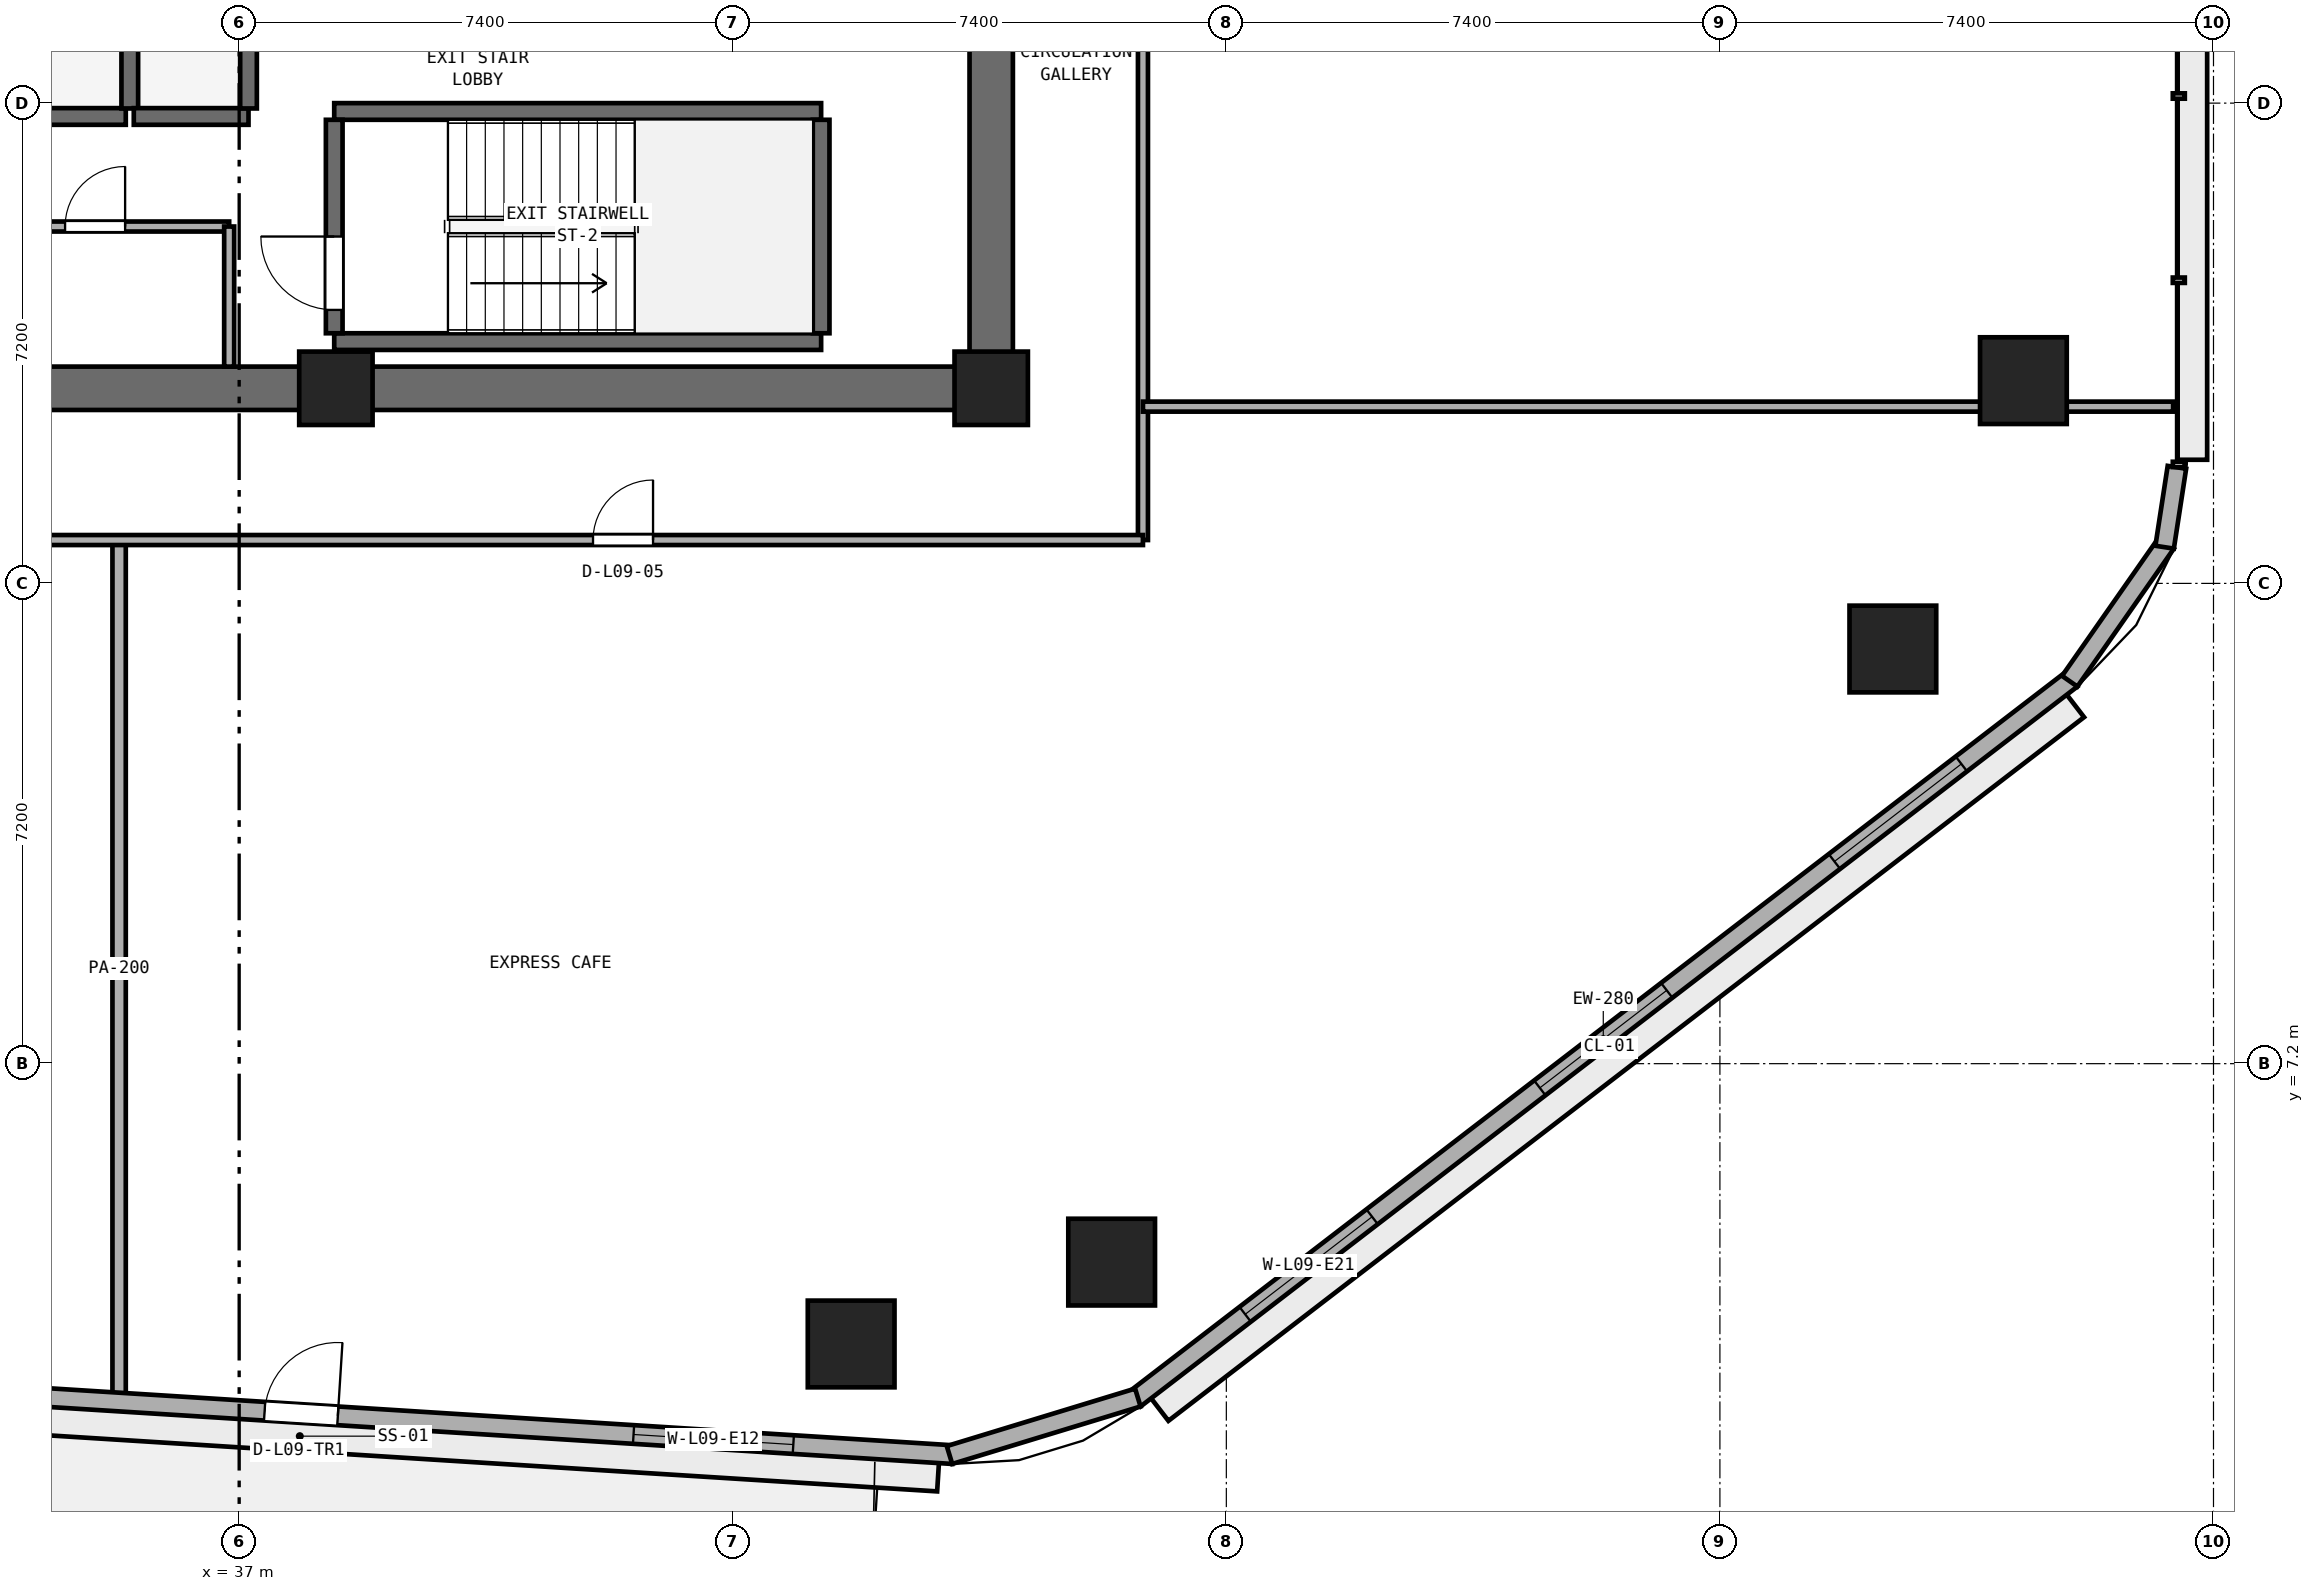
"""IFC4 building model, lengths in metres.
Left out: names, types, materials, properties, quantities, classifications, styles, units other than length and angle.
Written with IfcOpenShell. Run it as: python <this file> out.ifc"""

import sys

from ifc_helpers import new_model, si_unit, direction, frame, frame_2d, origin, origin_2d, place, context, subcontext, project, spatial, rectangle, extrude, element, fill, save


model = new_model("IFC4")
c1 = context("Model", 3, precision=1e-05, world=origin(), true_north=direction((0.0, 1.0)))
c2 = subcontext(c1, "Body", "Model", "MODEL_VIEW")
j1 = project(units=[si_unit("LENGTHUNIT", "METRE"), si_unit("PLANEANGLEUNIT", "RADIAN")], contexts=[c1])
p1 = place(None, origin())
s1 = spatial("IfcSite", under=j1, at=p1, CompositionType="ELEMENT")
p2 = place(p1, origin())
s2 = spatial("IfcBuilding", under=s1, at=p2, CompositionType="ELEMENT")
p3 = place(p2, frame((0.0, 0.0, 40.2)))
s3 = spatial("IfcBuildingStorey", under=s2, at=p3, CompositionType="ELEMENT", Elevation=40.2)
p4 = place(p3, frame((25.4, 17.325, 0.0), z_axis=(0.0, 0.0, 1.0), x_axis=(1.0, 0.0, 0.0)))
e1 = element("IfcWall", 1, at=p4, inside=s3, PredefinedType="SHEAR", context=c2, shape_type="SweptSolid", body=[
    extrude(rectangle(XDim=23.2, YDim=0.65, at=frame_2d((11.6, 0.0))), origin(), (0.0, 0.0, 1.0), 3.525),
])
p5 = place(p3, frame((48.275, 17.65, 0.0), z_axis=(0.0, 0.0, 1.0), x_axis=(0.0, 1.0, 0.0)))
e2 = element("IfcWall", 2, at=p5, inside=s3, PredefinedType="SHEAR", context=c2, shape_type="SweptSolid", body=[
    extrude(rectangle(XDim=15.1, YDim=0.65, at=frame_2d((7.55, 0.0))), origin(), (0.0, 0.0, 1.0), 3.525),
])
p6 = place(p5, frame((5.65, 0.0, 0.0)))
e3 = element("IfcOpeningElement", 3, at=p6, cuts=e2, PredefinedType="OPENING", context=c2, shape_type="SweptSolid", body=[
    extrude(rectangle(XDim=1.5, YDim=2.15, at=frame_2d((0.75, 1.075))), frame((0.0, 0.335, 0.0), z_axis=(0.0, -1.0, 0.0), x_axis=(1.0, 0.0, 0.0)), (0.0, 0.0, 1.0), 0.67),
])
for number, where, z_axis, x_axis in (
    (4, (38.45, 17.325, 0.0), (0.0, 0.0, 1.0), (1.0, 0.0, 0.0)),
    (5, (48.275, 17.325, 0.0), (0.0, 0.0, 1.0), (1.0, 0.0, 0.0)),
):
    element("IfcColumn", number, at=place(p3, frame(where, z_axis=z_axis, x_axis=x_axis)), inside=s3, PredefinedType="PILASTER", context=c2, shape_type="SweptSolid", body=[
        extrude(rectangle(XDim=1.1, YDim=1.1, at=origin_2d()), origin(), (0.0, 0.0, 1.0), 3.8),
    ])
for number, where, z_axis, x_axis in (
    (6, (46.175, 2.998, 0.0), (0.0, 0.0, 1.0), (1.0, 0.0, 0.0)),
    (7, (50.081, 4.225, 0.0), (0.0, 0.0, 1.0), (1.0, 0.0, 0.0)),
    (8, (61.793, 13.416, 0.0), (0.0, 0.0, 1.0), (1.0, 0.0, 0.0)),
    (9, (63.75, 17.44, 0.0), (0.0, 0.0, 1.0), (1.0, 0.0, 0.0)),
):
    element("IfcColumn", number, at=place(p3, frame(where, z_axis=z_axis, x_axis=x_axis)), inside=s3, PredefinedType="COLUMN", context=c2, shape_type="SweptSolid", body=[
        extrude(rectangle(XDim=1.3, YDim=1.3, at=origin_2d()), origin(), (0.0, 0.0, 1.0), 3.8),
    ])
for number, where, z_axis, x_axis in (
    (10, (38.425, 18.025, 0.0), (0.0, 0.0, 1.0), (1.0, 0.0, 0.0)),
    (11, (38.425, 21.475, 0.0), (0.0, 0.0, 1.0), (1.0, 0.0, 0.0)),
):
    element("IfcWall", number, at=place(p3, frame(where, z_axis=z_axis, x_axis=x_axis)), inside=s3, PredefinedType="SHEAR", context=c2, shape_type="SweptSolid", body=[
        extrude(rectangle(XDim=7.3, YDim=0.25, at=frame_2d((3.65, 0.0))), origin(), (0.0, 0.0, 1.0), 3.525),
    ])
p7 = place(p3, frame((38.425, 18.15, 0.0), z_axis=(0.0, 0.0, 1.0), x_axis=(0.0, 1.0, 0.0)))
e12 = element("IfcWall", 12, at=p7, inside=s3, PredefinedType="SHEAR", context=c2, shape_type="SweptSolid", body=[
    extrude(rectangle(XDim=3.2, YDim=0.25, at=frame_2d((1.6, 0.0))), origin(), (0.0, 0.0, 1.0), 3.525),
])
p8 = place(p7, frame((0.35, 0.0, 0.0)))
e13 = element("IfcOpeningElement", 13, at=p8, cuts=e12, PredefinedType="OPENING", context=c2, shape_type="SweptSolid", body=[
    extrude(rectangle(XDim=1.1, YDim=2.15, at=frame_2d((0.55, 1.075))), frame((0.0, 0.135, 0.0), z_axis=(0.0, -1.0, 0.0), x_axis=(1.0, 0.0, 0.0)), (0.0, 0.0, 1.0), 0.27),
])
p9 = place(p3, frame((45.725, 18.15, 0.0), z_axis=(0.0, 0.0, 1.0), x_axis=(0.0, 1.0, 0.0)))
e14 = element("IfcWall", 14, at=p9, inside=s3, PredefinedType="SHEAR", context=c2, shape_type="SweptSolid", body=[
    extrude(rectangle(XDim=3.2, YDim=0.25, at=frame_2d((1.6, 0.0))), origin(), (0.0, 0.0, 1.0), 3.525),
])
p10 = place(p3, frame((33.58, 21.4, 0.0), z_axis=(0.0, 0.0, 1.0), x_axis=(1.0, 0.0, 0.0)))
e15 = element("IfcWall", 15, at=p10, inside=s3, PredefinedType="SHEAR", context=c2, shape_type="SweptSolid", body=[
    extrude(rectangle(XDim=1.72, YDim=0.25, at=frame_2d((0.86, 0.0))), origin(), (0.0, 0.0, 1.0), 3.525),
])
p11 = place(p3, frame((35.36, 21.52, 0.0), z_axis=(0.0, 0.0, 1.0), x_axis=(0.0, 1.0, 0.0)))
e16 = element("IfcWall", 16, at=p11, inside=s3, PredefinedType="SHEAR", context=c2, shape_type="SweptSolid", body=[
    extrude(rectangle(XDim=1.96, YDim=0.25, at=frame_2d((0.98, 0.0))), origin(), (0.0, 0.0, 1.0), 3.525),
])
p12 = place(p3, frame((35.42, 21.4, 0.0), z_axis=(0.0, 0.0, 1.0), x_axis=(1.0, 0.0, 0.0)))
e17 = element("IfcWall", 17, at=p12, inside=s3, PredefinedType="SHEAR", context=c2, shape_type="SweptSolid", body=[
    extrude(rectangle(XDim=1.72, YDim=0.25, at=frame_2d((0.86, 0.0))), origin(), (0.0, 0.0, 1.0), 3.525),
])
p13 = place(p3, frame((37.14, 21.52, 0.0), z_axis=(0.0, 0.0, 1.0), x_axis=(0.0, 1.0, 0.0)))
e18 = element("IfcWall", 18, at=p13, inside=s3, PredefinedType="SHEAR", context=c2, shape_type="SweptSolid", body=[
    extrude(rectangle(XDim=1.96, YDim=0.25, at=frame_2d((0.98, 0.0))), origin(), (0.0, 0.0, 1.0), 3.525),
])
p14 = place(p3, frame((32.83, 19.75, 0.0), z_axis=(0.0, 0.0, 1.0), x_axis=(1.0, 0.0, 0.0)))
e19 = element("IfcWall", 19, at=p14, inside=s3, PredefinedType="PARTITIONING", context=c2, shape_type="SweptSolid", body=[
    extrude(rectangle(XDim=4.02, YDim=0.15, at=frame_2d((2.01, 0.0))), origin(), (0.0, 0.0, 1.0), 3.525),
])
p15 = place(p14, frame((1.56, 0.0, 0.0)))
e20 = element("IfcOpeningElement", 20, at=p15, cuts=e19, PredefinedType="OPENING", context=c2, shape_type="SweptSolid", body=[
    extrude(rectangle(XDim=0.9, YDim=2.1, at=frame_2d((0.45, 1.05))), frame((0.0, 0.085, 0.0), z_axis=(0.0, -1.0, 0.0), x_axis=(1.0, 0.0, 0.0)), (0.0, 0.0, 1.0), 0.17),
])
p16 = place(p3, frame((36.85, 17.65, 0.0), z_axis=(0.0, 0.0, 1.0), x_axis=(0.0, 1.0, 0.0)))
e21 = element("IfcWall", 21, at=p16, inside=s3, PredefinedType="PARTITIONING", context=c2, shape_type="SweptSolid", body=[
    extrude(rectangle(XDim=2.1, YDim=0.15, at=frame_2d((1.05, 0.0))), origin(), (0.0, 0.0, 1.0), 3.525),
])
p17 = place(p3, frame((50.55, 15.05, 0.0), z_axis=(0.0, 0.0, 1.0), x_axis=(0.0, 1.0, 0.0)))
e22 = element("IfcWall", 22, at=p17, inside=s3, PredefinedType="PARTITIONING", context=c2, shape_type="SweptSolid", body=[
    extrude(rectangle(XDim=20.3, YDim=0.15, at=frame_2d((10.15, 0.0))), origin(), (0.0, 0.0, 1.0), 3.525),
])
p18 = place(p17, frame((9.7, 0.0, 0.0)))
e23 = element("IfcOpeningElement", 23, at=p18, cuts=e22, PredefinedType="OPENING", context=c2, shape_type="SweptSolid", body=[
    extrude(rectangle(XDim=0.9, YDim=2.1, at=frame_2d((0.45, 1.05))), frame((0.0, 0.085, 0.0), z_axis=(0.0, -1.0, 0.0), x_axis=(1.0, 0.0, 0.0)), (0.0, 0.0, 1.0), 0.17),
])
p19 = place(p3, frame((35.2, 2.192, 0.0), z_axis=(0.0, 0.0, 1.0), x_axis=(0.0, 1.0, 0.0)))
e24 = element("IfcWall", 24, at=p19, inside=s3, PredefinedType="PARTITIONING", context=c2, shape_type="SweptSolid", body=[
    extrude(rectangle(XDim=12.858, YDim=0.2, at=frame_2d((6.429, 0.0))), origin(), (0.0, 0.0, 1.0), 3.525),
])
p20 = place(p3, frame((23.45, 15.05, 0.0), z_axis=(0.0, 0.0, 1.0), x_axis=(1.0, 0.0, 0.0)))
e25 = element("IfcWall", 25, at=p20, inside=s3, PredefinedType="PARTITIONING", context=c2, shape_type="SweptSolid", body=[
    extrude(rectangle(XDim=27.1, YDim=0.15, at=frame_2d((13.55, 0.0))), origin(), (0.0, 0.0, 1.0), 3.525),
])
p21 = place(p20, frame((5.17, 0.0, 0.0)))
e26 = element("IfcOpeningElement", 26, at=p21, cuts=e25, PredefinedType="OPENING", context=c2, shape_type="SweptSolid", body=[
    extrude(rectangle(XDim=1.65, YDim=2.15, at=frame_2d((0.825, 1.075))), frame((0.0, 0.085, 0.0), z_axis=(0.0, -1.0, 0.0), x_axis=(1.0, 0.0, 0.0)), (0.0, 0.0, 1.0), 0.17),
])
p22 = place(p20, frame((18.855, 0.0, 0.0)))
e27 = element("IfcOpeningElement", 27, at=p22, cuts=e25, PredefinedType="OPENING", context=c2, shape_type="SweptSolid", body=[
    extrude(rectangle(XDim=0.9, YDim=2.1, at=frame_2d((0.45, 1.05))), frame((0.0, 0.085, 0.0), z_axis=(0.0, -1.0, 0.0), x_axis=(1.0, 0.0, 0.0)), (0.0, 0.0, 1.0), 0.17),
])
p23 = place(p3, frame((50.55, 17.05, 0.0), z_axis=(0.0, 0.0, 1.0), x_axis=(1.0, 0.0, 0.0)))
e28 = element("IfcWall", 28, at=p23, inside=s3, PredefinedType="PARTITIONING", context=c2, shape_type="SweptSolid", body=[
    extrude(rectangle(XDim=15.445, YDim=0.15, at=frame_2d((7.723, 0.0))), origin(), (0.0, 0.0, 1.0), 3.525),
])
p24 = place(p3, frame((28.161, 2.571, 0.0), z_axis=(0.0, 0.0, 1.0), x_axis=(0.998017288298, -0.06294038654, 0.0)))
e29 = element("IfcWall", 29, at=p24, inside=s3, PredefinedType="STANDARD", context=c2, shape_type="SweptSolid", body=[
    extrude(rectangle(XDim=19.577, YDim=0.28, at=frame_2d((9.789, 0.0))), origin(), (0.0, 0.0, 1.0), 3.525),
])
p25 = place(p24, frame((9.239, 0.0, 0.0)))
e30 = element("IfcOpeningElement", 30, at=p25, cuts=e29, PredefinedType="OPENING", context=c2, shape_type="SweptSolid", body=[
    extrude(rectangle(XDim=1.1, YDim=2.2, at=frame_2d((0.55, 1.1))), frame((0.0, 0.15, 0.0), z_axis=(0.0, -1.0, 0.0), x_axis=(1.0, 0.0, 0.0)), (0.0, 0.0, 1.0), 0.3),
])
p26 = place(p24, frame((2.396, 0.0, 0.9)))
e31 = element("IfcOpeningElement", 31, at=p26, cuts=e29, PredefinedType="OPENING", context=c2, shape_type="SweptSolid", body=[
    extrude(rectangle(XDim=2.4, YDim=1.75, at=frame_2d((1.2, 0.875))), frame((0.0, 0.15, 0.0), z_axis=(0.0, -1.0, 0.0), x_axis=(1.0, 0.0, 0.0)), (0.0, 0.0, 1.0), 0.3),
])
p27 = place(p24, frame((14.781, 0.0, 0.9)))
e32 = element("IfcOpeningElement", 32, at=p27, cuts=e29, PredefinedType="OPENING", context=c2, shape_type="SweptSolid", body=[
    extrude(rectangle(XDim=2.4, YDim=1.75, at=frame_2d((1.2, 0.875))), frame((0.0, 0.15, 0.0), z_axis=(0.0, -1.0, 0.0), x_axis=(1.0, 0.0, 0.0)), (0.0, 0.0, 1.0), 0.3),
])
p28 = place(p3, frame((50.429, 2.172, 0.0), z_axis=(0.0, 0.0, 1.0), x_axis=(0.792937466367, 0.609303023488, 0.0)))
e33 = element("IfcWall", 33, at=p28, inside=s3, PredefinedType="STANDARD", context=c2, shape_type="SweptSolid", body=[
    extrude(rectangle(XDim=17.713, YDim=0.28, at=frame_2d((8.856, 0.0))), origin(), (0.0, 0.0, 1.0), 3.525),
])
p29 = place(p28, frame((2.085, 0.0, 0.9)))
e34 = element("IfcOpeningElement", 34, at=p29, cuts=e33, PredefinedType="OPENING", context=c2, shape_type="SweptSolid", body=[
    extrude(rectangle(XDim=2.4, YDim=1.75, at=frame_2d((1.2, 0.875))), frame((0.0, 0.15, 0.0), z_axis=(0.0, -1.0, 0.0), x_axis=(1.0, 0.0, 0.0)), (0.0, 0.0, 1.0), 0.3),
])
p30 = place(p28, frame((7.656, 0.0, 0.9)))
e35 = element("IfcOpeningElement", 35, at=p30, cuts=e33, PredefinedType="OPENING", context=c2, shape_type="SweptSolid", body=[
    extrude(rectangle(XDim=2.4, YDim=1.75, at=frame_2d((1.2, 0.875))), frame((0.0, 0.15, 0.0), z_axis=(0.0, -1.0, 0.0), x_axis=(1.0, 0.0, 0.0)), (0.0, 0.0, 1.0), 0.3),
])
p31 = place(p28, frame((13.227, 0.0, 0.9)))
e36 = element("IfcOpeningElement", 36, at=p31, cuts=e33, PredefinedType="OPENING", context=c2, shape_type="SweptSolid", body=[
    extrude(rectangle(XDim=2.4, YDim=1.75, at=frame_2d((1.2, 0.875))), frame((0.0, 0.15, 0.0), z_axis=(0.0, -1.0, 0.0), x_axis=(1.0, 0.0, 0.0)), (0.0, 0.0, 1.0), 0.3),
])
p32 = place(p3, frame((47.65, 1.333, 0.0), z_axis=(0.0, 0.0, 1.0), x_axis=(0.956461287977, 0.291859220516, 0.0)))
e37 = element("IfcWall", 37, at=p32, inside=s3, PredefinedType="STANDARD", context=c2, shape_type="SweptSolid", body=[
    extrude(rectangle(XDim=2.952, YDim=0.28, at=frame_2d((1.476, 0.0))), origin(), (0.0, 0.0, 1.0), 3.525),
])
p33 = place(p3, frame((64.444, 12.933, 0.0), z_axis=(0.0, 0.0, 1.0), x_axis=(0.573176686443, 0.819431806875, 0.0)))
e38 = element("IfcWall", 38, at=p33, inside=s3, PredefinedType="STANDARD", context=c2, shape_type="SweptSolid", body=[
    extrude(rectangle(XDim=2.524, YDim=0.28, at=frame_2d((1.262, 0.0))), origin(), (0.0, 0.0, 1.0), 3.525),
])
p34 = place(p3, frame((65.867, 14.943, 0.0), z_axis=(0.0, 0.0, 1.0), x_axis=(0.152102600021, 0.988364709541, 0.0)))
e39 = element("IfcWall", 39, at=p34, inside=s3, PredefinedType="STANDARD", context=c2, shape_type="SweptSolid", body=[
    extrude(rectangle(XDim=1.212, YDim=0.28, at=frame_2d((0.606, 0.0))), origin(), (0.0, 0.0, 1.0), 3.525),
])
p35 = place(p8, origin())
e40 = element("IfcDoor", 40, at=p35, inside=s3, OperationType="SINGLE_SWING_RIGHT", PredefinedType="DOOR", context=c2, shape_type="SweptSolid", body=[
    extrude(rectangle(XDim=1.1, YDim=2.15, at=frame_2d((0.55, 1.075))), frame((0.0, 0.025, 0.0), z_axis=(0.0, -1.0, 0.0), x_axis=(1.0, 0.0, 0.0)), (0.0, 0.0, 1.0), 0.05),
])
fill(e13, e40)
p36 = place(p15, origin())
e41 = element("IfcDoor", 41, at=p36, inside=s3, OperationType="SINGLE_SWING_RIGHT", PredefinedType="DOOR", context=c2, shape_type="SweptSolid", body=[
    extrude(rectangle(XDim=0.9, YDim=2.1, at=frame_2d((0.45, 1.05))), frame((0.0, 0.025, 0.0), z_axis=(0.0, -1.0, 0.0), x_axis=(1.0, 0.0, 0.0)), (0.0, 0.0, 1.0), 0.05),
])
fill(e20, e41)
p37 = place(p22, origin())
e42 = element("IfcDoor", 42, at=p37, inside=s3, OperationType="SINGLE_SWING_RIGHT", PredefinedType="DOOR", context=c2, shape_type="SweptSolid", body=[
    extrude(rectangle(XDim=0.9, YDim=2.1, at=frame_2d((0.45, 1.05))), frame((0.0, 0.025, 0.0), z_axis=(0.0, -1.0, 0.0), x_axis=(1.0, 0.0, 0.0)), (0.0, 0.0, 1.0), 0.05),
])
fill(e27, e42)
p38 = place(p25, origin())
e43 = element("IfcDoor", 43, at=p38, inside=s3, OperationType="SINGLE_SWING_RIGHT", PredefinedType="DOOR", context=c2, shape_type="SweptSolid", body=[
    extrude(rectangle(XDim=1.1, YDim=2.2, at=frame_2d((0.55, 1.1))), frame((0.0, 0.025, 0.0), z_axis=(0.0, -1.0, 0.0), x_axis=(1.0, 0.0, 0.0)), (0.0, 0.0, 1.0), 0.05),
])
fill(e30, e43)
p39 = place(p27, origin())
e44 = element("IfcWindow", 44, at=p39, inside=s3, PartitioningType="SINGLE_PANEL", PredefinedType="WINDOW", context=c2, shape_type="SweptSolid", body=[
    extrude(rectangle(XDim=2.4, YDim=1.75, at=frame_2d((1.2, 0.875))), frame((0.0, 0.03, 0.0), z_axis=(0.0, -1.0, 0.0), x_axis=(1.0, 0.0, 0.0)), (0.0, 0.0, 1.0), 0.06),
])
fill(e32, e44)
p40 = place(p29, origin())
e45 = element("IfcWindow", 45, at=p40, inside=s3, PartitioningType="SINGLE_PANEL", PredefinedType="WINDOW", context=c2, shape_type="SweptSolid", body=[
    extrude(rectangle(XDim=2.4, YDim=1.75, at=frame_2d((1.2, 0.875))), frame((0.0, 0.03, 0.0), z_axis=(0.0, -1.0, 0.0), x_axis=(1.0, 0.0, 0.0)), (0.0, 0.0, 1.0), 0.06),
])
fill(e34, e45)
p41 = place(p30, origin())
e46 = element("IfcWindow", 46, at=p41, inside=s3, PartitioningType="SINGLE_PANEL", PredefinedType="WINDOW", context=c2, shape_type="SweptSolid", body=[
    extrude(rectangle(XDim=2.4, YDim=1.75, at=frame_2d((1.2, 0.875))), frame((0.0, 0.03, 0.0), z_axis=(0.0, -1.0, 0.0), x_axis=(1.0, 0.0, 0.0)), (0.0, 0.0, 1.0), 0.06),
])
fill(e35, e46)
p42 = place(p31, origin())
e47 = element("IfcWindow", 47, at=p42, inside=s3, PartitioningType="SINGLE_PANEL", PredefinedType="WINDOW", context=c2, shape_type="SweptSolid", body=[
    extrude(rectangle(XDim=2.4, YDim=1.75, at=frame_2d((1.2, 0.875))), frame((0.0, 0.03, 0.0), z_axis=(0.0, -1.0, 0.0), x_axis=(1.0, 0.0, 0.0)), (0.0, 0.0, 1.0), 0.06),
])
fill(e36, e47)
save(model, sys.argv[1])
